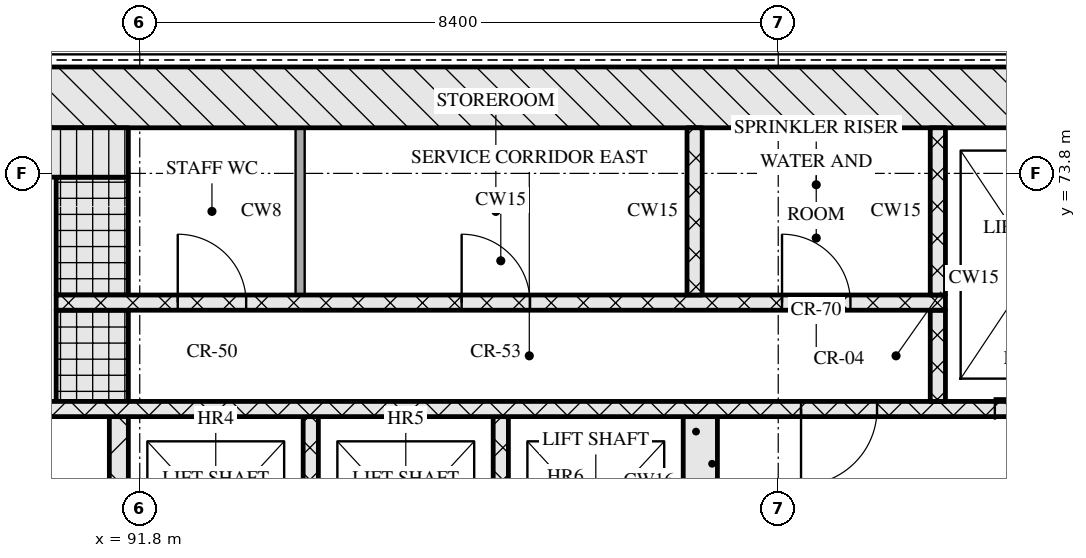
"""IFC4 building model, lengths in metres.
Left out: names, types, materials, properties, quantities, classifications, styles, units other than length and angle.
Written with IfcOpenShell. Run it as: python <this file> out.ifc"""

import sys

from ifc_helpers import new_model, si_unit, direction, frame, frame_2d, origin, place, context, subcontext, project, spatial, rectangle, extrude, element, fill, save


model = new_model("IFC4")
c1 = context("Model", 3, precision=1e-05, world=origin(), true_north=direction((0.0, 1.0)))
c2 = subcontext(c1, "Body", "Model", "MODEL_VIEW")
j1 = project(units=[si_unit("LENGTHUNIT", "METRE"), si_unit("PLANEANGLEUNIT", "RADIAN")], contexts=[c1])
p1 = place(None, origin())
s1 = spatial("IfcSite", under=j1, at=p1, CompositionType="ELEMENT")
p2 = place(p1, origin())
s2 = spatial("IfcBuilding", under=s1, at=p2, CompositionType="ELEMENT")
p3 = place(p2, frame((0.0, 0.0, 158.25)))
s3 = spatial("IfcBuildingStorey", under=s2, at=p3, CompositionType="ELEMENT", Elevation=158.25)
p4 = place(p3, frame((67.0, 74.8, 0.0), z_axis=(0.0, 0.0, 1.0), x_axis=(1.0, 0.0, 0.0)))
e1 = element("IfcWall", 1, at=p4, inside=s3, PredefinedType="SOLIDWALL", context=c2, shape_type="SweptSolid", body=[
    extrude(rectangle(XDim=41.2, YDim=0.8, at=frame_2d((20.6, 0.0))), origin(), (0.0, 0.0, 1.0), 3.32),
])
p5 = place(p3, frame((91.525, 68.0, 0.0), z_axis=(0.0, 0.0, 1.0), x_axis=(0.0, 1.0, 0.0)))
e2 = element("IfcWall", 2, at=p5, inside=s3, PredefinedType="SOLIDWALL", context=c2, shape_type="SweptSolid", body=[
    extrude(rectangle(XDim=2.6, YDim=0.25, at=frame_2d((1.3, 0.0))), origin(), (0.0, 0.0, 1.0), 3.32),
])
for number, where, z_axis, x_axis in (
    (3, (94.05, 68.0, 0.0), (0.0, 0.0, 1.0), (0.0, 1.0, 0.0)),
    (4, (96.55, 68.0, 0.0), (0.0, 0.0, 1.0), (0.0, 1.0, 0.0)),
):
    element("IfcWall", number, at=place(p3, frame(where, z_axis=z_axis, x_axis=x_axis)), inside=s3, PredefinedType="SOLIDWALL", context=c2, shape_type="SweptSolid", body=[
        extrude(rectangle(XDim=2.6, YDim=0.2, at=frame_2d((1.3, 0.0))), origin(), (0.0, 0.0, 1.0), 3.32),
    ])
p6 = place(p3, frame((99.175, 68.3, 0.0), z_axis=(0.0, 0.0, 1.0), x_axis=(0.0, 1.0, 0.0)))
e5 = element("IfcWall", 5, at=p6, inside=s3, PredefinedType="SOLIDWALL", context=c2, shape_type="SweptSolid", body=[
    extrude(rectangle(XDim=2.3, YDim=0.45, at=frame_2d((1.15, 0.0))), origin(), (0.0, 0.0, 1.0), 3.32),
])
p7 = place(p3, frame((67.8, 70.7, 0.0), z_axis=(0.0, 0.0, 1.0), x_axis=(1.0, 0.0, 0.0)))
e6 = element("IfcWall", 6, at=p7, inside=s3, PredefinedType="SOLIDWALL", context=c2, shape_type="SweptSolid", body=[
    extrude(rectangle(XDim=39.6, YDim=0.2, at=frame_2d((19.8, 0.0))), origin(), (0.0, 0.0, 1.0), 3.32),
])
p8 = place(p7, frame((0.65, 0.0, 0.0)))
e7 = element("IfcOpeningElement", 7, at=p8, cuts=e6, PredefinedType="OPENING", context=c2, shape_type="SweptSolid", body=[
    extrude(rectangle(XDim=1.1, YDim=2.1, at=frame_2d((0.55, 1.05))), frame((0.0, 0.11, 0.0), z_axis=(0.0, -1.0, 0.0), x_axis=(1.0, 0.0, 0.0)), (0.0, 0.0, 1.0), 0.22),
])
p9 = place(p7, frame((3.25, 0.0, 0.0)))
e8 = element("IfcOpeningElement", 8, at=p9, cuts=e6, PredefinedType="OPENING", context=c2, shape_type="SweptSolid", body=[
    extrude(rectangle(XDim=1.1, YDim=2.1, at=frame_2d((0.55, 1.05))), frame((0.0, 0.11, 0.0), z_axis=(0.0, -1.0, 0.0), x_axis=(1.0, 0.0, 0.0)), (0.0, 0.0, 1.0), 0.22),
])
p10 = place(p7, frame((5.9, 0.0, 0.0)))
e9 = element("IfcOpeningElement", 9, at=p10, cuts=e6, PredefinedType="OPENING", context=c2, shape_type="SweptSolid", body=[
    extrude(rectangle(XDim=1.0, YDim=2.1, at=frame_2d((0.5, 1.05))), frame((0.0, 0.11, 0.0), z_axis=(0.0, -1.0, 0.0), x_axis=(1.0, 0.0, 0.0)), (0.0, 0.0, 1.0), 0.22),
])
p11 = place(p7, frame((21.7, 0.0, 0.0)))
e10 = element("IfcOpeningElement", 10, at=p11, cuts=e6, PredefinedType="OPENING", context=c2, shape_type="SweptSolid", body=[
    extrude(rectangle(XDim=1.0, YDim=2.1, at=frame_2d((0.5, 1.05))), frame((0.0, 0.11, 0.0), z_axis=(0.0, -1.0, 0.0), x_axis=(1.0, 0.0, 0.0)), (0.0, 0.0, 1.0), 0.22),
])
p12 = place(p7, frame((32.7, 0.0, 0.0)))
e11 = element("IfcOpeningElement", 11, at=p12, cuts=e6, PredefinedType="OPENING", context=c2, shape_type="SweptSolid", body=[
    extrude(rectangle(XDim=1.0, YDim=2.1, at=frame_2d((0.5, 1.05))), frame((0.0, 0.11, 0.0), z_axis=(0.0, -1.0, 0.0), x_axis=(1.0, 0.0, 0.0)), (0.0, 0.0, 1.0), 0.22),
])
p13 = place(p7, frame((35.25, 0.0, 0.0)))
e12 = element("IfcOpeningElement", 12, at=p13, cuts=e6, PredefinedType="OPENING", context=c2, shape_type="SweptSolid", body=[
    extrude(rectangle(XDim=1.1, YDim=2.1, at=frame_2d((0.55, 1.05))), frame((0.0, 0.11, 0.0), z_axis=(0.0, -1.0, 0.0), x_axis=(1.0, 0.0, 0.0)), (0.0, 0.0, 1.0), 0.22),
])
p14 = place(p7, frame((37.85, 0.0, 0.0)))
e13 = element("IfcOpeningElement", 13, at=p14, cuts=e6, PredefinedType="OPENING", context=c2, shape_type="SweptSolid", body=[
    extrude(rectangle(XDim=1.1, YDim=2.1, at=frame_2d((0.55, 1.05))), frame((0.0, 0.11, 0.0), z_axis=(0.0, -1.0, 0.0), x_axis=(1.0, 0.0, 0.0)), (0.0, 0.0, 1.0), 0.22),
])
p15 = place(p3, frame((91.175, 70.8, 0.0), z_axis=(0.0, 0.0, 1.0), x_axis=(0.0, 1.0, 0.0)))
e14 = element("IfcWall", 14, at=p15, inside=s3, PredefinedType="SOLIDWALL", context=c2, shape_type="SweptSolid", body=[
    extrude(rectangle(XDim=1.2, YDim=0.95, at=frame_2d((0.6, 0.0))), origin(), (0.0, 0.0, 1.0), 3.32),
])
p16 = place(p3, frame((102.3, 70.8, 0.0), z_axis=(0.0, 0.0, 1.0), x_axis=(0.0, 1.0, 0.0)))
e15 = element("IfcWall", 15, at=p16, inside=s3, PredefinedType="SOLIDWALL", context=c2, shape_type="SweptSolid", body=[
    extrude(rectangle(XDim=1.2, YDim=0.2, at=frame_2d((0.6, 0.0))), origin(), (0.0, 0.0, 1.0), 3.32),
])
p17 = place(p3, frame((90.7, 72.1, 0.0), z_axis=(0.0, 0.0, 1.0), x_axis=(1.0, 0.0, 0.0)))
e16 = element("IfcWall", 16, at=p17, inside=s3, PredefinedType="SOLIDWALL", context=c2, shape_type="SweptSolid", body=[
    extrude(rectangle(XDim=11.7, YDim=0.2, at=frame_2d((5.85, 0.0))), origin(), (0.0, 0.0, 1.0), 3.32),
])
p18 = place(p17, frame((1.6, 0.0, 0.0)))
e17 = element("IfcOpeningElement", 17, at=p18, cuts=e16, PredefinedType="OPENING", context=c2, shape_type="SweptSolid", body=[
    extrude(rectangle(XDim=0.9, YDim=2.1, at=frame_2d((0.45, 1.05))), frame((0.0, 0.11, 0.0), z_axis=(0.0, -1.0, 0.0), x_axis=(1.0, 0.0, 0.0)), (0.0, 0.0, 1.0), 0.22),
])
p19 = place(p17, frame((5.335, 0.0, 0.0)))
e18 = element("IfcOpeningElement", 18, at=p19, cuts=e16, PredefinedType="OPENING", context=c2, shape_type="SweptSolid", body=[
    extrude(rectangle(XDim=0.9, YDim=2.1, at=frame_2d((0.45, 1.05))), frame((0.0, 0.11, 0.0), z_axis=(0.0, -1.0, 0.0), x_axis=(1.0, 0.0, 0.0)), (0.0, 0.0, 1.0), 0.22),
])
p20 = place(p17, frame((9.55, 0.0, 0.0)))
e19 = element("IfcOpeningElement", 19, at=p20, cuts=e16, PredefinedType="OPENING", context=c2, shape_type="SweptSolid", body=[
    extrude(rectangle(XDim=0.9, YDim=2.1, at=frame_2d((0.45, 1.05))), frame((0.0, 0.11, 0.0), z_axis=(0.0, -1.0, 0.0), x_axis=(1.0, 0.0, 0.0)), (0.0, 0.0, 1.0), 0.22),
])
p21 = place(p3, frame((91.175, 72.2, 0.0), z_axis=(0.0, 0.0, 1.0), x_axis=(0.0, 1.0, 0.0)))
e20 = element("IfcWall", 20, at=p21, inside=s3, PredefinedType="SOLIDWALL", context=c2, shape_type="SweptSolid", body=[
    extrude(rectangle(XDim=1.55, YDim=0.95, at=frame_2d((0.775, 0.0))), origin(), (0.0, 0.0, 1.0), 3.32),
])
p22 = place(p3, frame((93.91, 72.2, 0.0), z_axis=(0.0, 0.0, 1.0), x_axis=(0.0, 1.0, 0.0)))
e21 = element("IfcWall", 21, at=p22, inside=s3, PredefinedType="PARTITIONING", context=c2, shape_type="SweptSolid", body=[
    extrude(rectangle(XDim=2.2, YDim=0.12, at=frame_2d((1.1, 0.0))), origin(), (0.0, 0.0, 1.0), 3.32),
])
for number, where, z_axis, x_axis in (
    (22, (99.1, 72.2, 0.0), (0.0, 0.0, 1.0), (0.0, 1.0, 0.0)),
    (23, (102.3, 72.2, 0.0), (0.0, 0.0, 1.0), (0.0, 1.0, 0.0)),
):
    element("IfcWall", number, at=place(p3, frame(where, z_axis=z_axis, x_axis=x_axis)), inside=s3, PredefinedType="SOLIDWALL", context=c2, shape_type="SweptSolid", body=[
        extrude(rectangle(XDim=2.2, YDim=0.2, at=frame_2d((1.1, 0.0))), origin(), (0.0, 0.0, 1.0), 3.32),
    ])
p23 = place(p3, frame((83.55, 74.075, 0.0), z_axis=(0.0, 0.0, 1.0), x_axis=(1.0, 0.0, 0.0)))
e24 = element("IfcWall", 24, at=p23, inside=s3, PredefinedType="SOLIDWALL", context=c2, shape_type="SweptSolid", body=[
    extrude(rectangle(XDim=8.1, YDim=0.65, at=frame_2d((4.05, 0.0))), origin(), (0.0, 0.0, 1.0), 3.32),
])
p24 = place(p12, origin())
e25 = element("IfcDoor", 25, at=p24, inside=s3, OperationType="SINGLE_SWING_RIGHT", PredefinedType="DOOR", context=c2, shape_type="SweptSolid", body=[
    extrude(rectangle(XDim=1.0, YDim=2.1, at=frame_2d((0.5, 1.05))), frame((0.0, 0.025, 0.0), z_axis=(0.0, -1.0, 0.0), x_axis=(1.0, 0.0, 0.0)), (0.0, 0.0, 1.0), 0.05),
])
fill(e11, e25)
p25 = place(p13, origin())
e26 = element("IfcDoor", 26, at=p25, inside=s3, OperationType="SLIDING_TO_RIGHT", PredefinedType="DOOR", context=c2, shape_type="SweptSolid", body=[
    extrude(rectangle(XDim=1.1, YDim=2.1, at=frame_2d((0.55, 1.05))), frame((0.0, 0.025, 0.0), z_axis=(0.0, -1.0, 0.0), x_axis=(1.0, 0.0, 0.0)), (0.0, 0.0, 1.0), 0.05),
])
fill(e12, e26)
p26 = place(p18, origin())
e27 = element("IfcDoor", 27, at=p26, inside=s3, OperationType="SINGLE_SWING_LEFT", PredefinedType="DOOR", context=c2, shape_type="SweptSolid", body=[
    extrude(rectangle(XDim=0.9, YDim=2.1, at=frame_2d((0.45, 1.05))), frame((0.0, 0.025, 0.0), z_axis=(0.0, -1.0, 0.0), x_axis=(1.0, 0.0, 0.0)), (0.0, 0.0, 1.0), 0.05),
])
fill(e17, e27)
p27 = place(p19, origin())
e28 = element("IfcDoor", 28, at=p27, inside=s3, OperationType="SINGLE_SWING_LEFT", PredefinedType="DOOR", context=c2, shape_type="SweptSolid", body=[
    extrude(rectangle(XDim=0.9, YDim=2.1, at=frame_2d((0.45, 1.05))), frame((0.0, 0.025, 0.0), z_axis=(0.0, -1.0, 0.0), x_axis=(1.0, 0.0, 0.0)), (0.0, 0.0, 1.0), 0.05),
])
fill(e18, e28)
p28 = place(p20, origin())
e29 = element("IfcDoor", 29, at=p28, inside=s3, OperationType="SINGLE_SWING_LEFT", PredefinedType="DOOR", context=c2, shape_type="SweptSolid", body=[
    extrude(rectangle(XDim=0.9, YDim=2.1, at=frame_2d((0.45, 1.05))), frame((0.0, 0.025, 0.0), z_axis=(0.0, -1.0, 0.0), x_axis=(1.0, 0.0, 0.0)), (0.0, 0.0, 1.0), 0.05),
])
fill(e19, e29)
save(model, sys.argv[1])
